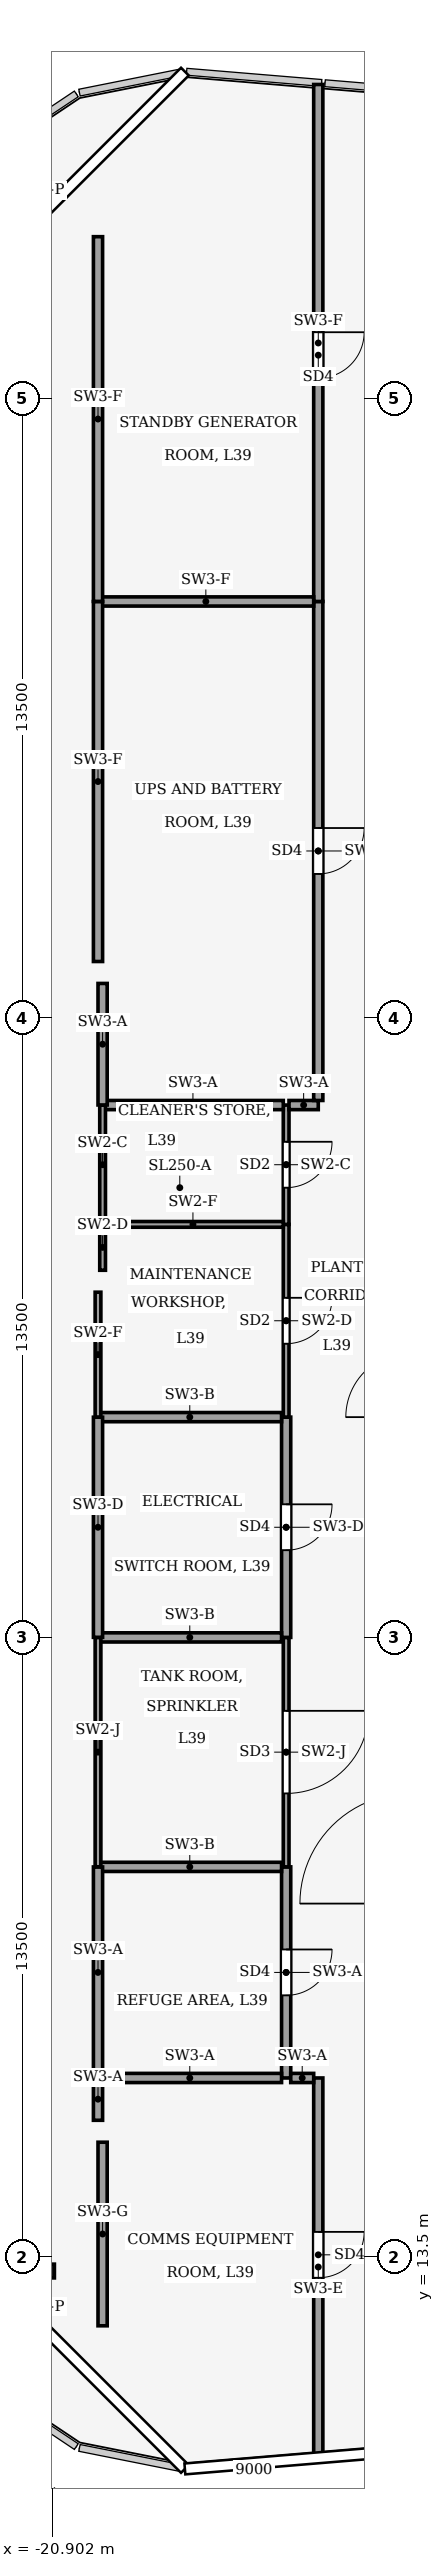
"""IFC4 building model, lengths in metres.
Left out: names, types, materials, properties, quantities, classifications, styles, units other than length and angle.
Written with IfcOpenShell. Run it as: python <this file> out.ifc"""

import sys

from ifc_helpers import new_model, si_unit, direction, frame, frame_2d, origin, origin_2d, place, context, subcontext, project, spatial, rectangle, hollow_rectangle, i_section, extrude, element, fill, save


model = new_model("IFC4")
c1 = context("Model", 3, precision=1e-05, world=origin(), true_north=direction((0.0, 1.0)))
c2 = subcontext(c1, "Body", "Model", "MODEL_VIEW")
j1 = project(units=[si_unit("LENGTHUNIT", "METRE"), si_unit("PLANEANGLEUNIT", "RADIAN")], contexts=[c1])
p1 = place(None, origin())
s1 = spatial("IfcSite", under=j1, at=p1, CompositionType="ELEMENT")
p2 = place(p1, origin())
s2 = spatial("IfcBuilding", under=s1, at=p2, CompositionType="ELEMENT")
p3 = place(p2, frame((0.0, 0.0, 170.0)))
s3 = spatial("IfcBuildingStorey", under=s2, at=p3, CompositionType="ELEMENT", Elevation=170.0)
p4 = place(p3, frame((-21.0, 58.0, 0.494), z_axis=(0.0, 0.799437544408, 0.600749209397), x_axis=(-1.0, 0.0, 0.0)))
e1 = element("IfcColumn", 1, at=p4, inside=s3, PredefinedType="COLUMN", context=c2, shape_type="SweptSolid", body=[
    extrude(hollow_rectangle(XDim=1.2, YDim=1.2, WallThickness=0.07, at=origin_2d()), origin(), (0.0, 0.0, 1.0), 10.007),
])
p5 = place(p3, frame((-21.0, 12.0, 0.345), z_axis=(0.0, 0.535428326995, 0.84458066912), x_axis=(-1.0, 0.0, 0.0)))
e2 = element("IfcColumn", 2, at=p5, inside=s3, PredefinedType="COLUMN", context=c2, shape_type="SweptSolid", body=[
    extrude(hollow_rectangle(XDim=1.2, YDim=1.2, WallThickness=0.07, at=origin_2d()), origin(), (0.0, 0.0, 1.0), 7.471),
])
p6 = place(p3, frame((-21.0, 35.0, 0.446), z_axis=(0.0, 0.715189741462, 0.698930349683), x_axis=(-1.0, 0.0, 0.0)))
e3 = element("IfcColumn", 3, at=p6, inside=s3, PredefinedType="COLUMN", context=c2, shape_type="SweptSolid", body=[
    extrude(hollow_rectangle(XDim=1.2, YDim=1.2, WallThickness=0.07, at=origin_2d()), origin(), (0.0, 0.0, 1.0), 8.739),
])
p7 = place(p3, frame((-21.0, 13.193, 3.585), z_axis=(0.0, 0.0, 1.0), x_axis=(1.0, 0.0, 0.0)))
e4 = element("IfcColumn", 4, at=p7, inside=s3, PredefinedType="COLUMN", context=c2, shape_type="SweptSolid", body=[
    extrude(i_section(OverallWidth=0.3, OverallDepth=0.3, WebThickness=0.011, FlangeThickness=0.019, FilletRadius=0.027, at=origin_2d()), origin(), (0.0, 0.0, 1.0), 3.115),
])
p8 = place(p3, frame((-15.8, 22.0, 0.0), z_axis=(0.0, 0.0, 1.0), x_axis=(0.0, -1.0, 0.0)))
e5 = element("IfcWall", 5, at=p8, inside=s3, PredefinedType="PARTITIONING", context=c2, shape_type="SweptSolid", body=[
    extrude(rectangle(XDim=4.6, YDim=0.2, at=frame_2d((2.3, 0.0))), origin(), (0.0, 0.0, 1.0), 6.14),
])
p9 = place(p8, frame((1.8, 0.0, 0.0)))
e6 = element("IfcOpeningElement", 6, at=p9, cuts=e5, PredefinedType="OPENING", context=c2, shape_type="SweptSolid", body=[
    extrude(rectangle(XDim=1.0, YDim=2.1, at=frame_2d((0.5, 1.05))), frame((0.0, 0.11, 0.0), z_axis=(0.0, -1.0, 0.0), x_axis=(1.0, 0.0, 0.0)), (0.0, 0.0, 1.0), 0.22),
])
p10 = place(p3, frame((-15.8, 27.0, 0.0), z_axis=(0.0, 0.0, 1.0), x_axis=(0.0, -1.0, 0.0)))
e7 = element("IfcWall", 7, at=p10, inside=s3, PredefinedType="PARTITIONING", context=c2, shape_type="SweptSolid", body=[
    extrude(rectangle(XDim=5.0, YDim=0.125, at=frame_2d((2.5, 0.0))), origin(), (0.0, 0.0, 1.0), 6.39),
])
p11 = place(p10, frame((1.6, 0.0, 0.0)))
e8 = element("IfcOpeningElement", 8, at=p11, cuts=e7, PredefinedType="OPENING", context=c2, shape_type="SweptSolid", body=[
    extrude(rectangle(XDim=1.8, YDim=2.4, at=frame_2d((0.9, 1.2))), frame((0.0, 0.073, 0.0), z_axis=(0.0, -1.0, 0.0), x_axis=(1.0, 0.0, 0.0)), (0.0, 0.0, 1.0), 0.145),
])
p12 = place(p3, frame((-15.8, 31.8, 0.0), z_axis=(0.0, 0.0, 1.0), x_axis=(0.0, -1.0, 0.0)))
e9 = element("IfcWall", 9, at=p12, inside=s3, PredefinedType="PARTITIONING", context=c2, shape_type="SweptSolid", body=[
    extrude(rectangle(XDim=4.8, YDim=0.2, at=frame_2d((2.4, 0.0))), origin(), (0.0, 0.0, 1.0), 6.44),
])
p13 = place(p12, frame((1.9, 0.0, 0.0)))
e10 = element("IfcOpeningElement", 10, at=p13, cuts=e9, PredefinedType="OPENING", context=c2, shape_type="SweptSolid", body=[
    extrude(rectangle(XDim=1.0, YDim=2.1, at=frame_2d((0.5, 1.05))), frame((0.0, 0.11, 0.0), z_axis=(0.0, -1.0, 0.0), x_axis=(1.0, 0.0, 0.0)), (0.0, 0.0, 1.0), 0.22),
])
p14 = place(p3, frame((-15.8, 36.0, 0.0), z_axis=(0.0, 0.0, 1.0), x_axis=(0.0, -1.0, 0.0)))
e11 = element("IfcWall", 11, at=p14, inside=s3, PredefinedType="PARTITIONING", context=c2, shape_type="SweptSolid", body=[
    extrude(rectangle(XDim=4.2, YDim=0.125, at=frame_2d((2.1, 0.0))), origin(), (0.0, 0.0, 1.0), 6.44),
])
p15 = place(p14, frame((1.6, 0.0, 0.0)))
e12 = element("IfcOpeningElement", 12, at=p15, cuts=e11, PredefinedType="OPENING", context=c2, shape_type="SweptSolid", body=[
    extrude(rectangle(XDim=1.0, YDim=2.1, at=frame_2d((0.5, 1.05))), frame((0.0, 0.073, 0.0), z_axis=(0.0, -1.0, 0.0), x_axis=(1.0, 0.0, 0.0)), (0.0, 0.0, 1.0), 0.145),
])
p16 = place(p3, frame((-15.8, 38.6, 0.0), z_axis=(0.0, 0.0, 1.0), x_axis=(0.0, -1.0, 0.0)))
e13 = element("IfcWall", 13, at=p16, inside=s3, PredefinedType="PARTITIONING", context=c2, shape_type="SweptSolid", body=[
    extrude(rectangle(XDim=2.6, YDim=0.125, at=frame_2d((1.3, 0.0))), origin(), (0.0, 0.0, 1.0), 6.14),
])
p17 = place(p16, frame((0.8, 0.0, 0.0)))
e14 = element("IfcOpeningElement", 14, at=p17, cuts=e13, PredefinedType="OPENING", context=c2, shape_type="SweptSolid", body=[
    extrude(rectangle(XDim=1.0, YDim=2.1, at=frame_2d((0.5, 1.05))), frame((0.0, 0.073, 0.0), z_axis=(0.0, -1.0, 0.0), x_axis=(1.0, 0.0, 0.0)), (0.0, 0.0, 1.0), 0.145),
])
p18 = place(p3, frame((-15.1, 17.4, 0.0), z_axis=(0.0, 0.0, 1.0), x_axis=(0.0, -1.0, 0.0)))
e15 = element("IfcWall", 15, at=p18, inside=s3, PredefinedType="PARTITIONING", context=c2, shape_type="SweptSolid", body=[
    extrude(rectangle(XDim=8.238, YDim=0.2, at=frame_2d((4.119, 0.0))), origin(), (0.0, 0.0, 1.0), 6.04),
])
p19 = place(p18, frame((3.354, 0.0, 0.0)))
e16 = element("IfcOpeningElement", 16, at=p19, cuts=e15, PredefinedType="OPENING", context=c2, shape_type="SweptSolid", body=[
    extrude(rectangle(XDim=1.0, YDim=2.1, at=frame_2d((0.5, 1.05))), frame((0.0, 0.11, 0.0), z_axis=(0.0, -1.0, 0.0), x_axis=(1.0, 0.0, 0.0)), (0.0, 0.0, 1.0), 0.22),
])
p20 = place(p3, frame((-15.2, 17.4, 0.0), z_axis=(0.0, 0.0, 1.0), x_axis=(-1.0, 0.0, 0.0)))
e17 = element("IfcWall", 17, at=p20, inside=s3, PredefinedType="PARTITIONING", context=c2, shape_type="SweptSolid", body=[
    extrude(rectangle(XDim=0.5, YDim=0.2, at=frame_2d((0.25, 0.0))), origin(), (0.0, 0.0, 1.0), 6.14),
])
p21 = place(p3, frame((-15.738, 38.6, 0.0), z_axis=(0.0, 0.0, 1.0), x_axis=(1.0, 0.0, 0.0)))
e18 = element("IfcWall", 18, at=p21, inside=s3, PredefinedType="PARTITIONING", context=c2, shape_type="SweptSolid", body=[
    extrude(rectangle(XDim=0.637, YDim=0.2, at=frame_2d((0.319, 0.0))), origin(), (0.0, 0.0, 1.0), 6.14),
])
p22 = place(p3, frame((-15.1, 49.573, 0.0), z_axis=(0.0, 0.0, 1.0), x_axis=(0.0, -1.0, 0.0)))
e19 = element("IfcWall", 19, at=p22, inside=s3, PredefinedType="PARTITIONING", context=c2, shape_type="SweptSolid", body=[
    extrude(rectangle(XDim=10.873, YDim=0.2, at=frame_2d((5.437, 0.0))), origin(), (0.0, 0.0, 1.0), 6.14),
])
p23 = place(p22, frame((4.937, 0.0, 0.0)))
e20 = element("IfcOpeningElement", 20, at=p23, cuts=e19, PredefinedType="OPENING", context=c2, shape_type="SweptSolid", body=[
    extrude(rectangle(XDim=1.0, YDim=2.1, at=frame_2d((0.5, 1.05))), frame((0.0, 0.11, 0.0), z_axis=(0.0, -1.0, 0.0), x_axis=(1.0, 0.0, 0.0)), (0.0, 0.0, 1.0), 0.22),
])
p24 = place(p3, frame((-15.1, 60.838, 0.0), z_axis=(0.0, 0.0, 1.0), x_axis=(0.0, -1.0, 0.0)))
e21 = element("IfcWall", 21, at=p24, inside=s3, PredefinedType="PARTITIONING", context=c2, shape_type="SweptSolid", body=[
    extrude(rectangle(XDim=11.265, YDim=0.2, at=frame_2d((5.633, 0.0))), origin(), (0.0, 0.0, 1.0), 6.24),
])
p25 = place(p24, frame((5.398, 0.0, 0.0)))
e22 = element("IfcOpeningElement", 22, at=p25, cuts=e21, PredefinedType="OPENING", context=c2, shape_type="SweptSolid", body=[
    extrude(rectangle(XDim=1.0, YDim=2.1, at=frame_2d((0.5, 1.05))), frame((0.0, 0.11, 0.0), z_axis=(0.0, -1.0, 0.0), x_axis=(1.0, 0.0, 0.0)), (0.0, 0.0, 1.0), 0.22),
])
p26 = place(p3, frame((-19.9, 22.0, 0.0), z_axis=(0.0, 0.0, 1.0), x_axis=(1.0, 0.0, 0.0)))
e23 = element("IfcWall", 23, at=p26, inside=s3, PredefinedType="PARTITIONING", context=c2, shape_type="SweptSolid", body=[
    extrude(rectangle(XDim=4.0, YDim=0.2, at=frame_2d((2.0, 0.0))), origin(), (0.0, 0.0, 1.0), 6.87),
])
p27 = place(p3, frame((-15.9, 17.4, 0.0), z_axis=(0.0, 0.0, 1.0), x_axis=(-1.0, 0.0, 0.0)))
e24 = element("IfcWall", 24, at=p27, inside=s3, PredefinedType="PARTITIONING", context=c2, shape_type="SweptSolid", body=[
    extrude(rectangle(XDim=4.0, YDim=0.2, at=frame_2d((2.0, 0.0))), origin(), (0.0, 0.0, 1.0), 6.14),
])
for number, where, z_axis, x_axis in (
    (25, (-19.9, 27.0, 0.0), (0.0, 0.0, 1.0), (1.0, 0.0, 0.0)),
    (26, (-19.9, 31.8, 0.0), (0.0, 0.0, 1.0), (1.0, 0.0, 0.0)),
):
    element("IfcWall", number, at=place(p3, frame(where, z_axis=z_axis, x_axis=x_axis)), inside=s3, PredefinedType="PARTITIONING", context=c2, shape_type="SweptSolid", body=[
        extrude(rectangle(XDim=4.0, YDim=0.2, at=frame_2d((2.0, 0.0))), origin(), (0.0, 0.0, 1.0), 6.87),
    ])
p28 = place(p3, frame((-19.8, 36.0, 0.0), z_axis=(0.0, 0.0, 1.0), x_axis=(1.0, 0.0, 0.0)))
e27 = element("IfcWall", 27, at=p28, inside=s3, PredefinedType="PARTITIONING", context=c2, shape_type="SweptSolid", body=[
    extrude(rectangle(XDim=3.938, YDim=0.125, at=frame_2d((1.969, 0.0))), origin(), (0.0, 0.0, 1.0), 6.87),
])
p29 = place(p3, frame((-19.8, 38.6, 0.0), z_axis=(0.0, 0.0, 1.0), x_axis=(1.0, 0.0, 0.0)))
e28 = element("IfcWall", 28, at=p29, inside=s3, PredefinedType="PARTITIONING", context=c2, shape_type="SweptSolid", body=[
    extrude(rectangle(XDim=3.938, YDim=0.2, at=frame_2d((1.969, 0.0))), origin(), (0.0, 0.0, 1.0), 6.14),
])
p30 = place(p3, frame((-19.9, 49.573, 0.0), z_axis=(0.0, 0.0, 1.0), x_axis=(1.0, 0.0, 0.0)))
e29 = element("IfcWall", 29, at=p30, inside=s3, PredefinedType="PARTITIONING", context=c2, shape_type="SweptSolid", body=[
    extrude(rectangle(XDim=4.7, YDim=0.2, at=frame_2d((2.35, 0.0))), origin(), (0.0, 0.0, 1.0), 6.24),
])
p31 = place(p3, frame((-19.9, 17.402, 0.0), z_axis=(0.0, 0.0, 1.0), x_axis=(0.0, 1.0, 0.0)))
e30 = element("IfcWall", 30, at=p31, inside=s3, PredefinedType="PARTITIONING", context=c2, shape_type="SweptSolid", body=[
    extrude(rectangle(XDim=4.596, YDim=0.2, at=frame_2d((2.298, 0.0))), origin(), (0.0, 0.0, 1.0), 6.14),
])
p32 = place(p3, frame((-19.9, 22.002, 0.0), z_axis=(0.0, 0.0, 1.0), x_axis=(0.0, 1.0, 0.0)))
e31 = element("IfcWall", 31, at=p32, inside=s3, PredefinedType="PARTITIONING", context=c2, shape_type="SweptSolid", body=[
    extrude(rectangle(XDim=4.996, YDim=0.125, at=frame_2d((2.498, 0.0))), origin(), (0.0, 0.0, 1.0), 6.39),
])
p33 = place(p3, frame((-19.9, 27.002, 0.0), z_axis=(0.0, 0.0, 1.0), x_axis=(0.0, 1.0, 0.0)))
e32 = element("IfcWall", 32, at=p33, inside=s3, PredefinedType="PARTITIONING", context=c2, shape_type="SweptSolid", body=[
    extrude(rectangle(XDim=4.796, YDim=0.2, at=frame_2d((2.398, 0.0))), origin(), (0.0, 0.0, 1.0), 6.44),
])
p34 = place(p3, frame((-19.9, 31.802, 0.0), z_axis=(0.0, 0.0, 1.0), x_axis=(0.0, 1.0, 0.0)))
e33 = element("IfcWall", 33, at=p34, inside=s3, PredefinedType="PARTITIONING", context=c2, shape_type="SweptSolid", body=[
    extrude(rectangle(XDim=2.72, YDim=0.125, at=frame_2d((1.36, 0.0))), origin(), (0.0, 0.0, 1.0), 6.87),
])
p35 = place(p3, frame((-19.8, 35.0, 0.0), z_axis=(0.0, 0.0, 1.0), x_axis=(0.0, 1.0, 0.0)))
e34 = element("IfcWall", 34, at=p35, inside=s3, PredefinedType="PARTITIONING", context=c2, shape_type="SweptSolid", body=[
    extrude(rectangle(XDim=0.998, YDim=0.125, at=frame_2d((0.499, 0.0))), origin(), (0.0, 0.0, 1.0), 6.44),
])
p36 = place(p3, frame((-19.8, 36.002, 0.0), z_axis=(0.0, 0.0, 1.0), x_axis=(0.0, 1.0, 0.0)))
e35 = element("IfcWall", 35, at=p36, inside=s3, PredefinedType="PARTITIONING", context=c2, shape_type="SweptSolid", body=[
    extrude(rectangle(XDim=2.596, YDim=0.125, at=frame_2d((1.298, 0.0))), origin(), (0.0, 0.0, 1.0), 6.14),
])
p37 = place(p3, frame((-19.8, 12.0, 0.0), z_axis=(0.0, 0.0, 1.0), x_axis=(0.0, 1.0, 0.0)))
e36 = element("IfcWall", 36, at=p37, inside=s3, PredefinedType="PARTITIONING", context=c2, shape_type="SweptSolid", body=[
    extrude(rectangle(XDim=4.0, YDim=0.2, at=frame_2d((2.0, 0.0))), origin(), (0.0, 0.0, 1.0), 5.93),
])
p38 = place(p3, frame((-19.9, 16.478, 0.0), z_axis=(0.0, 0.0, 1.0), x_axis=(0.0, 1.0, 0.0)))
e37 = element("IfcWall", 37, at=p38, inside=s3, PredefinedType="PARTITIONING", context=c2, shape_type="SweptSolid", body=[
    extrude(rectangle(XDim=0.92, YDim=0.2, at=frame_2d((0.46, 0.0))), origin(), (0.0, 0.0, 1.0), 6.14),
])
p39 = place(p3, frame((-19.8, 38.602, 0.0), z_axis=(0.0, 0.0, 1.0), x_axis=(0.0, 1.0, 0.0)))
e38 = element("IfcWall", 38, at=p39, inside=s3, PredefinedType="PARTITIONING", context=c2, shape_type="SweptSolid", body=[
    extrude(rectangle(XDim=2.648, YDim=0.2, at=frame_2d((1.324, 0.0))), origin(), (0.0, 0.0, 1.0), 6.14),
])
p40 = place(p3, frame((-19.9, 41.728, 0.0), z_axis=(0.0, 0.0, 1.0), x_axis=(0.0, 1.0, 0.0)))
e39 = element("IfcWall", 39, at=p40, inside=s3, PredefinedType="PARTITIONING", context=c2, shape_type="SweptSolid", body=[
    extrude(rectangle(XDim=7.843, YDim=0.2, at=frame_2d((3.921, 0.0))), origin(), (0.0, 0.0, 1.0), 6.24),
])
p41 = place(p3, frame((-19.9, 49.575, 0.0), z_axis=(0.0, 0.0, 1.0), x_axis=(0.0, 1.0, 0.0)))
e40 = element("IfcWall", 40, at=p41, inside=s3, PredefinedType="PARTITIONING", context=c2, shape_type="SweptSolid", body=[
    extrude(rectangle(XDim=7.947, YDim=0.2, at=frame_2d((3.974, 0.0))), origin(), (0.0, 0.0, 1.0), 6.24),
])
p42 = place(p9, origin())
e41 = element("IfcDoor", 41, at=p42, inside=s3, OperationType="SINGLE_SWING_LEFT", PredefinedType="DOOR", context=c2, shape_type="SweptSolid", body=[
    extrude(rectangle(XDim=1.0, YDim=2.1, at=frame_2d((0.5, 1.05))), frame((0.0, 0.025, 0.0), z_axis=(0.0, -1.0, 0.0), x_axis=(1.0, 0.0, 0.0)), (0.0, 0.0, 1.0), 0.05),
])
fill(e6, e41)
p43 = place(p11, origin())
e42 = element("IfcDoor", 42, at=p43, inside=s3, OperationType="DOUBLE_DOOR_SINGLE_SWING", PredefinedType="DOOR", context=c2, shape_type="SweptSolid", body=[
    extrude(rectangle(XDim=1.8, YDim=2.4, at=frame_2d((0.9, 1.2))), frame((0.0, 0.025, 0.0), z_axis=(0.0, -1.0, 0.0), x_axis=(1.0, 0.0, 0.0)), (0.0, 0.0, 1.0), 0.05),
])
fill(e8, e42)
p44 = place(p13, origin())
e43 = element("IfcDoor", 43, at=p44, inside=s3, OperationType="SINGLE_SWING_LEFT", PredefinedType="DOOR", context=c2, shape_type="SweptSolid", body=[
    extrude(rectangle(XDim=1.0, YDim=2.1, at=frame_2d((0.5, 1.05))), frame((0.0, 0.025, 0.0), z_axis=(0.0, -1.0, 0.0), x_axis=(1.0, 0.0, 0.0)), (0.0, 0.0, 1.0), 0.05),
])
fill(e10, e43)
p45 = place(p15, origin())
e44 = element("IfcDoor", 44, at=p45, inside=s3, OperationType="SINGLE_SWING_RIGHT", PredefinedType="DOOR", context=c2, shape_type="SweptSolid", body=[
    extrude(rectangle(XDim=1.0, YDim=2.1, at=frame_2d((0.5, 1.05))), frame((0.0, 0.025, 0.0), z_axis=(0.0, -1.0, 0.0), x_axis=(1.0, 0.0, 0.0)), (0.0, 0.0, 1.0), 0.05),
])
fill(e12, e44)
p46 = place(p17, origin())
e45 = element("IfcDoor", 45, at=p46, inside=s3, OperationType="SINGLE_SWING_LEFT", PredefinedType="DOOR", context=c2, shape_type="SweptSolid", body=[
    extrude(rectangle(XDim=1.0, YDim=2.1, at=frame_2d((0.5, 1.05))), frame((0.0, 0.025, 0.0), z_axis=(0.0, -1.0, 0.0), x_axis=(1.0, 0.0, 0.0)), (0.0, 0.0, 1.0), 0.05),
])
fill(e14, e45)
p47 = place(p19, origin())
e46 = element("IfcDoor", 46, at=p47, inside=s3, OperationType="SINGLE_SWING_LEFT", PredefinedType="DOOR", context=c2, shape_type="SweptSolid", body=[
    extrude(rectangle(XDim=1.0, YDim=2.1, at=frame_2d((0.5, 1.05))), frame((0.0, 0.025, 0.0), z_axis=(0.0, -1.0, 0.0), x_axis=(1.0, 0.0, 0.0)), (0.0, 0.0, 1.0), 0.05),
])
fill(e16, e46)
p48 = place(p23, origin())
e47 = element("IfcDoor", 47, at=p48, inside=s3, OperationType="SINGLE_SWING_LEFT", PredefinedType="DOOR", context=c2, shape_type="SweptSolid", body=[
    extrude(rectangle(XDim=1.0, YDim=2.1, at=frame_2d((0.5, 1.05))), frame((0.0, 0.025, 0.0), z_axis=(0.0, -1.0, 0.0), x_axis=(1.0, 0.0, 0.0)), (0.0, 0.0, 1.0), 0.05),
])
fill(e20, e47)
p49 = place(p25, origin())
e48 = element("IfcDoor", 48, at=p49, inside=s3, OperationType="SINGLE_SWING_RIGHT", PredefinedType="DOOR", context=c2, shape_type="SweptSolid", body=[
    extrude(rectangle(XDim=1.0, YDim=2.1, at=frame_2d((0.5, 1.05))), frame((0.0, 0.025, 0.0), z_axis=(0.0, -1.0, 0.0), x_axis=(1.0, 0.0, 0.0)), (0.0, 0.0, 1.0), 0.05),
])
fill(e22, e48)
save(model, sys.argv[1])
